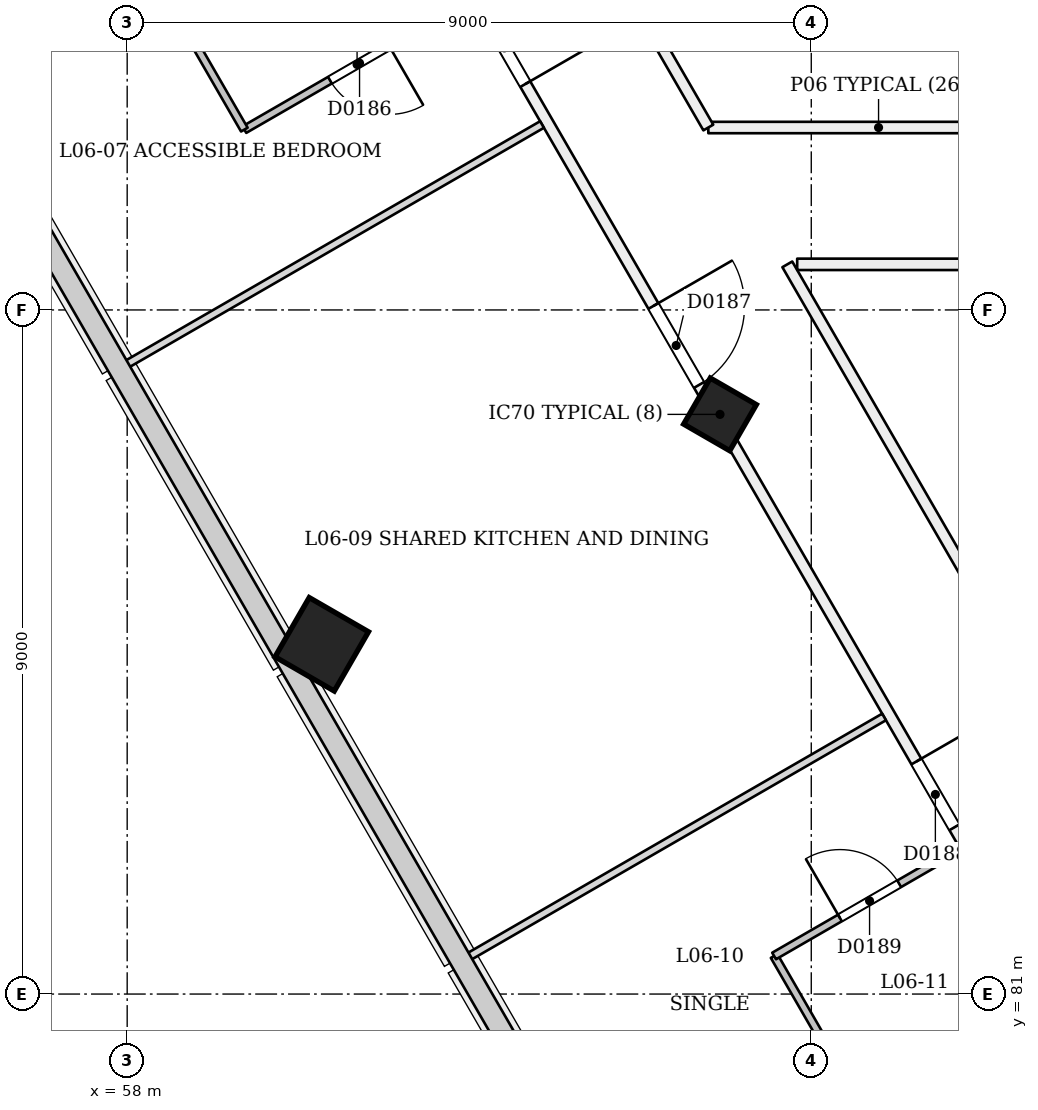
"""IFC4 building model, lengths in metres.
Left out: names, types, materials, properties, quantities, classifications, styles, units other than length and angle.
Written with IfcOpenShell. Run it as: python <this file> out.ifc"""

import sys

from ifc_helpers import new_model, si_unit, direction, frame, frame_2d, origin, origin_2d, place, context, subcontext, project, spatial, rectangle, extrude, element, fill, save


model = new_model("IFC4")
c1 = context("Model", 3, precision=1e-05, world=origin(), true_north=direction((0.0, 1.0)))
c2 = subcontext(c1, "Body", "Model", "MODEL_VIEW")
j1 = project(units=[si_unit("LENGTHUNIT", "METRE"), si_unit("PLANEANGLEUNIT", "RADIAN")], contexts=[c1])
p1 = place(None, origin())
s1 = spatial("IfcSite", under=j1, at=p1, CompositionType="ELEMENT")
p2 = place(p1, origin())
s2 = spatial("IfcBuilding", under=s1, at=p2, CompositionType="ELEMENT")
p3 = place(p2, frame((0.0, 0.0, 30.6)))
s3 = spatial("IfcBuildingStorey", under=s2, at=p3, CompositionType="ELEMENT", Elevation=30.6)
p4 = place(p3, frame((65.772, 88.579, -0.021), z_axis=(0.02215519141, 0.038415882353, 0.999016199807), x_axis=(-0.865361939077, -0.499673629592, 0.038405446053)))
e1 = element("IfcColumn", 1, at=p4, inside=s3, PredefinedType="COLUMN", context=c2, shape_type="SweptSolid", body=[
    extrude(rectangle(XDim=0.7, YDim=0.7, at=origin_2d()), origin(), (0.0, 0.0, 1.0), 3.604),
])
p5 = place(p3, frame((60.532, 85.554, -0.027), z_axis=(0.022222910879, 0.038415824599, 0.999014697916), x_axis=(-0.866021331072, -0.498527657424, 0.038434735731)))
e2 = element("IfcColumn", 2, at=p5, inside=s3, PredefinedType="COLUMN", context=c2, shape_type="SweptSolid", body=[
    extrude(rectangle(XDim=0.9, YDim=0.9, at=origin_2d()), origin(), (0.0, 0.0, 1.0), 3.604),
])
p6 = place(p3, frame((70.125, 92.4, 0.0), z_axis=(0.0, 0.0, 1.0), x_axis=(-1.0, 0.0, 0.0)))
e3 = element("IfcWall", 3, at=p6, inside=s3, PredefinedType="PARTITIONING", context=c2, shape_type="SweptSolid", body=[
    extrude(rectangle(XDim=4.479, YDim=0.15, at=frame_2d((2.24, 0.0))), origin(), (0.0, 0.0, 1.0), 3.1),
])
p7 = place(p3, frame((65.646, 92.4, 0.0), z_axis=(0.0, 0.0, 1.0), x_axis=(-0.499964565595, 0.866045860881, 0.0)))
e4 = element("IfcWall", 4, at=p7, inside=s3, PredefinedType="PARTITIONING", context=c2, shape_type="SweptSolid", body=[
    extrude(rectangle(XDim=4.626, YDim=0.15, at=frame_2d((2.313, 0.0))), origin(), (0.0, 0.0, 1.0), 3.1),
])
p8 = place(p7, frame((3.401, 0.0, 0.0)))
e5 = element("IfcOpeningElement", 5, at=p8, cuts=e4, PredefinedType="OPENING", context=c2, shape_type="SweptSolid", body=[
    extrude(rectangle(XDim=1.0, YDim=2.1, at=frame_2d((0.5, 1.05))), frame((0.0, 0.085, 0.0), z_axis=(0.0, -1.0, 0.0), x_axis=(1.0, 0.0, 0.0)), (0.0, 0.0, 1.0), 0.171),
])
p9 = place(p3, frame((61.273, 96.374, 0.0), z_axis=(0.0, 0.0, 1.0), x_axis=(0.5000018851, -0.866024315419, 0.0)))
e6 = element("IfcWall", 6, at=p9, inside=s3, PredefinedType="PARTITIONING", context=c2, shape_type="SweptSolid", body=[
    extrude(rectangle(XDim=45.0, YDim=0.15, at=frame_2d((22.5, 0.0))), origin(), (0.0, 0.0, 1.0), 2.7),
])
p10 = place(p9, frame((2.829, 0.0, 0.0)))
e7 = element("IfcOpeningElement", 7, at=p10, cuts=e6, PredefinedType="OPENING", context=c2, shape_type="SweptSolid", body=[
    extrude(rectangle(XDim=1.1, YDim=2.1, at=frame_2d((0.55, 1.05))), frame((0.0, 0.085, 0.0), z_axis=(0.0, -1.0, 0.0), x_axis=(1.0, 0.0, 0.0)), (0.0, 0.0, 1.0), 0.171),
])
p11 = place(p9, frame((7.3, 0.0, 0.0)))
e8 = element("IfcOpeningElement", 8, at=p11, cuts=e6, PredefinedType="OPENING", context=c2, shape_type="SweptSolid", body=[
    extrude(rectangle(XDim=1.2, YDim=2.1, at=frame_2d((0.6, 1.05))), frame((0.0, 0.085, 0.0), z_axis=(0.0, -1.0, 0.0), x_axis=(1.0, 0.0, 0.0)), (0.0, 0.0, 1.0), 0.171),
])
p12 = place(p9, frame((14.22, 0.0, 0.0)))
e9 = element("IfcOpeningElement", 9, at=p12, cuts=e6, PredefinedType="OPENING", context=c2, shape_type="SweptSolid", body=[
    extrude(rectangle(XDim=1.0, YDim=2.1, at=frame_2d((0.5, 1.05))), frame((0.0, 0.085, 0.0), z_axis=(0.0, -1.0, 0.0), x_axis=(1.0, 0.0, 0.0)), (0.0, 0.0, 1.0), 0.171),
])
p13 = place(p9, frame((20.895, 0.0, 0.0)))
e10 = element("IfcOpeningElement", 10, at=p13, cuts=e6, PredefinedType="OPENING", context=c2, shape_type="SweptSolid", body=[
    extrude(rectangle(XDim=1.0, YDim=2.1, at=frame_2d((0.5, 1.05))), frame((0.0, 0.085, 0.0), z_axis=(0.0, -1.0, 0.0), x_axis=(1.0, 0.0, 0.0)), (0.0, 0.0, 1.0), 0.171),
])
p14 = place(p9, frame((24.25, 0.0, 0.0)))
e11 = element("IfcOpeningElement", 11, at=p14, cuts=e6, PredefinedType="OPENING", context=c2, shape_type="SweptSolid", body=[
    extrude(rectangle(XDim=1.0, YDim=2.1, at=frame_2d((0.5, 1.05))), frame((0.0, 0.085, 0.0), z_axis=(0.0, -1.0, 0.0), x_axis=(1.0, 0.0, 0.0)), (0.0, 0.0, 1.0), 0.171),
])
p15 = place(p9, frame((29.78, 0.0, 0.0)))
e12 = element("IfcOpeningElement", 12, at=p15, cuts=e6, PredefinedType="OPENING", context=c2, shape_type="SweptSolid", body=[
    extrude(rectangle(XDim=1.0, YDim=2.1, at=frame_2d((0.5, 1.05))), frame((0.0, 0.085, 0.0), z_axis=(0.0, -1.0, 0.0), x_axis=(1.0, 0.0, 0.0)), (0.0, 0.0, 1.0), 0.171),
])
p16 = place(p9, frame((34.3, 0.0, 0.0)))
e13 = element("IfcOpeningElement", 13, at=p16, cuts=e6, PredefinedType="OPENING", context=c2, shape_type="SweptSolid", body=[
    extrude(rectangle(XDim=1.2, YDim=2.1, at=frame_2d((0.6, 1.05))), frame((0.0, 0.085, 0.0), z_axis=(0.0, -1.0, 0.0), x_axis=(1.0, 0.0, 0.0)), (0.0, 0.0, 1.0), 0.171),
])
p17 = place(p9, frame((41.22, 0.0, 0.0)))
e14 = element("IfcOpeningElement", 14, at=p17, cuts=e6, PredefinedType="OPENING", context=c2, shape_type="SweptSolid", body=[
    extrude(rectangle(XDim=1.0, YDim=2.1, at=frame_2d((0.5, 1.05))), frame((0.0, 0.085, 0.0), z_axis=(0.0, -1.0, 0.0), x_axis=(1.0, 0.0, 0.0)), (0.0, 0.0, 1.0), 0.171),
])
p18 = place(p3, frame((84.831, 59.171, 0.0), z_axis=(0.0, 0.0, 1.0), x_axis=(-0.499999056994, 0.866025948229, 0.0)))
e15 = element("IfcWall", 15, at=p18, inside=s3, PredefinedType="PARTITIONING", context=c2, shape_type="SweptSolid", body=[
    extrude(rectangle(XDim=36.292, YDim=0.15, at=frame_2d((18.146, 0.0))), origin(), (0.0, 0.0, 1.0), 3.1),
])
p19 = place(p18, frame((16.276, 0.0, 0.0)))
e16 = element("IfcOpeningElement", 16, at=p19, cuts=e15, PredefinedType="OPENING", context=c2, shape_type="SweptSolid", body=[
    extrude(rectangle(XDim=1.2, YDim=2.1, at=frame_2d((0.6, 1.05))), frame((0.0, 0.085, 0.0), z_axis=(0.0, -1.0, 0.0), x_axis=(1.0, 0.0, 0.0)), (0.0, 0.0, 1.0), 0.171),
])
p20 = place(p18, frame((27.931, 0.0, 0.0)))
e17 = element("IfcOpeningElement", 17, at=p20, cuts=e15, PredefinedType="OPENING", context=c2, shape_type="SweptSolid", body=[
    extrude(rectangle(XDim=1.2, YDim=2.1, at=frame_2d((0.6, 1.05))), frame((0.0, 0.085, 0.0), z_axis=(0.0, -1.0, 0.0), x_axis=(1.0, 0.0, 0.0)), (0.0, 0.0, 1.0), 0.171),
])
p21 = place(p3, frame((66.815, 90.6, 0.0), z_axis=(0.0, 0.0, 1.0), x_axis=(0.999999997932, -6.4309715e-05, 0.0)))
e18 = element("IfcWall", 18, at=p21, inside=s3, PredefinedType="PARTITIONING", context=c2, shape_type="SweptSolid", body=[
    extrude(rectangle(XDim=15.185, YDim=0.15, at=frame_2d((7.593, 0.0))), origin(), (0.0, 0.0, 1.0), 3.1),
])
p22 = place(p21, frame((11.492, 0.0, 0.0)))
e19 = element("IfcOpeningElement", 19, at=p22, cuts=e18, PredefinedType="OPENING", context=c2, shape_type="SweptSolid", body=[
    extrude(rectangle(XDim=1.2, YDim=2.1, at=frame_2d((0.6, 1.05))), frame((0.0, 0.085, 0.0), z_axis=(0.0, -1.0, 0.0), x_axis=(1.0, 0.0, 0.0)), (0.0, 0.0, 1.0), 0.171),
])
p23 = place(p3, frame((55.713, 93.164, 0.0), z_axis=(0.0, 0.0, 1.0), x_axis=(0.866032430508, 0.49998782916, 0.0)))
e20 = element("IfcWall", 20, at=p23, inside=s3, PredefinedType="PARTITIONING", context=c2, shape_type="SweptSolid", body=[
    extrude(rectangle(XDim=2.92, YDim=0.15, at=frame_2d((1.46, 0.0))), origin(), (0.0, 0.0, 1.0), 3.1),
])
p24 = place(p3, frame((62.508, 94.085, 0.0), z_axis=(0.0, 0.0, 1.0), x_axis=(-0.866032454348, -0.499987787867, 0.0)))
e21 = element("IfcWall", 21, at=p24, inside=s3, PredefinedType="PARTITIONING", context=c2, shape_type="SweptSolid", body=[
    extrude(rectangle(XDim=3.425, YDim=0.1, at=frame_2d((1.712, 0.0))), origin(), (0.0, 0.0, 1.0), 3.1),
])
p25 = place(p24, frame((1.225, 0.0, 0.0)))
e22 = element("IfcOpeningElement", 22, at=p25, cuts=e21, PredefinedType="OPENING", context=c2, shape_type="SweptSolid", body=[
    extrude(rectangle(XDim=0.9, YDim=2.1, at=frame_2d((0.45, 1.05))), frame((0.0, 0.061, 0.0), z_axis=(0.0, -1.0, 0.0), x_axis=(1.0, 0.0, 0.0)), (0.0, 0.0, 1.0), 0.121),
])
p26 = place(p3, frame((59.542, 92.373, 0.0), z_axis=(0.0, 0.0, 1.0), x_axis=(-0.500047596559, 0.865997922154, 0.0)))
e23 = element("IfcWall", 23, at=p26, inside=s3, PredefinedType="PARTITIONING", context=c2, shape_type="SweptSolid", body=[
    extrude(rectangle(XDim=2.6, YDim=0.1, at=frame_2d((1.3, 0.0))), origin(), (0.0, 0.0, 1.0), 2.6),
])
for number, where, z_axis, x_axis in (
    (24, (57.963, 89.267, 0.0), (0.0, 0.0, 1.0), (0.866, 0.5, 0.0)),
    (25, (62.463, 81.473, 0.0), (0.0, 0.0, 1.0), (0.866, 0.5, 0.0)),
):
    element("IfcWall", number, at=place(p3, frame(where, z_axis=z_axis, x_axis=x_axis)), inside=s3, PredefinedType="PARTITIONING", context=c2, shape_type="SweptSolid", body=[
        extrude(rectangle(XDim=6.345, YDim=0.1, at=frame_2d((3.173, 0.0))), origin(), (0.0, 0.0, 1.0), 2.6),
    ])
p27 = place(p3, frame((67.761, 79.336, 0.0), z_axis=(0.0, 0.0, 1.0), x_axis=(-0.500004234368, 0.866022959057, 0.0)))
e26 = element("IfcWall", 26, at=p27, inside=s3, PredefinedType="PARTITIONING", context=c2, shape_type="SweptSolid", body=[
    extrude(rectangle(XDim=2.5, YDim=0.1, at=frame_2d((1.25, 0.0))), origin(), (0.0, 0.0, 1.0), 2.7),
])
p28 = place(p3, frame((66.511, 81.501, 0.0), z_axis=(0.0, 0.0, 1.0), x_axis=(0.866011447264, 0.500024172624, 0.0)))
e27 = element("IfcWall", 27, at=p28, inside=s3, PredefinedType="PARTITIONING", context=c2, shape_type="SweptSolid", body=[
    extrude(rectangle(XDim=2.825, YDim=0.1, at=frame_2d((1.413, 0.0))), origin(), (0.0, 0.0, 1.0), 3.1),
])
p29 = place(p28, frame((1.0, 0.0, 0.0)))
e28 = element("IfcOpeningElement", 28, at=p29, cuts=e27, PredefinedType="OPENING", context=c2, shape_type="SweptSolid", body=[
    extrude(rectangle(XDim=0.9, YDim=2.1, at=frame_2d((0.45, 1.05))), frame((0.0, 0.061, 0.0), z_axis=(0.0, -1.0, 0.0), x_axis=(1.0, 0.0, 0.0)), (0.0, 0.0, 1.0), 0.121),
])
p30 = place(p3, frame((67.744, 79.326, 0.0), z_axis=(0.0, 0.0, 1.0), x_axis=(0.866048401274, 0.499960165064, 0.0)))
e29 = element("IfcWall", 29, at=p30, inside=s3, PredefinedType="PARTITIONING", context=c2, shape_type="SweptSolid", body=[
    extrude(rectangle(XDim=2.845, YDim=0.1, at=frame_2d((1.422, 0.0))), origin(), (0.0, 0.0, 1.0), 2.7),
])
p31 = place(p10, origin())
e30 = element("IfcDoor", 30, at=p31, inside=s3, OperationType="SINGLE_SWING_RIGHT", PredefinedType="NOTDEFINED", context=c2, shape_type="SweptSolid", body=[
    extrude(rectangle(XDim=1.1, YDim=2.1, at=frame_2d((0.55, 1.05))), frame((0.0, 0.025, 0.0), z_axis=(0.0, -1.0, 0.0), x_axis=(1.0, 0.0, 0.0)), (0.0, 0.0, 1.0), 0.05),
])
fill(e7, e30)
p32 = place(p25, origin())
e31 = element("IfcDoor", 31, at=p32, inside=s3, OperationType="SINGLE_SWING_LEFT", PredefinedType="NOTDEFINED", context=c2, shape_type="SweptSolid", body=[
    extrude(rectangle(XDim=0.9, YDim=2.1, at=frame_2d((0.45, 1.05))), frame((0.0, 0.025, 0.0), z_axis=(0.0, -1.0, 0.0), x_axis=(1.0, 0.0, 0.0)), (0.0, 0.0, 1.0), 0.05),
])
fill(e22, e31)
p33 = place(p11, origin())
e32 = element("IfcDoor", 32, at=p33, inside=s3, OperationType="SINGLE_SWING_LEFT", PredefinedType="NOTDEFINED", context=c2, shape_type="SweptSolid", body=[
    extrude(rectangle(XDim=1.2, YDim=2.1, at=frame_2d((0.6, 1.05))), frame((0.0, 0.025, 0.0), z_axis=(0.0, -1.0, 0.0), x_axis=(1.0, 0.0, 0.0)), (0.0, 0.0, 1.0), 0.05),
])
fill(e8, e32)
p34 = place(p12, origin())
e33 = element("IfcDoor", 33, at=p34, inside=s3, OperationType="SINGLE_SWING_LEFT", PredefinedType="NOTDEFINED", context=c2, shape_type="SweptSolid", body=[
    extrude(rectangle(XDim=1.0, YDim=2.1, at=frame_2d((0.5, 1.05))), frame((0.0, 0.025, 0.0), z_axis=(0.0, -1.0, 0.0), x_axis=(1.0, 0.0, 0.0)), (0.0, 0.0, 1.0), 0.05),
])
fill(e9, e33)
p35 = place(p29, origin())
e34 = element("IfcDoor", 34, at=p35, inside=s3, OperationType="SINGLE_SWING_LEFT", PredefinedType="NOTDEFINED", context=c2, shape_type="SweptSolid", body=[
    extrude(rectangle(XDim=0.9, YDim=2.1, at=frame_2d((0.45, 1.05))), frame((0.0, 0.025, 0.0), z_axis=(0.0, -1.0, 0.0), x_axis=(1.0, 0.0, 0.0)), (0.0, 0.0, 1.0), 0.05),
])
fill(e28, e34)
save(model, sys.argv[1])
